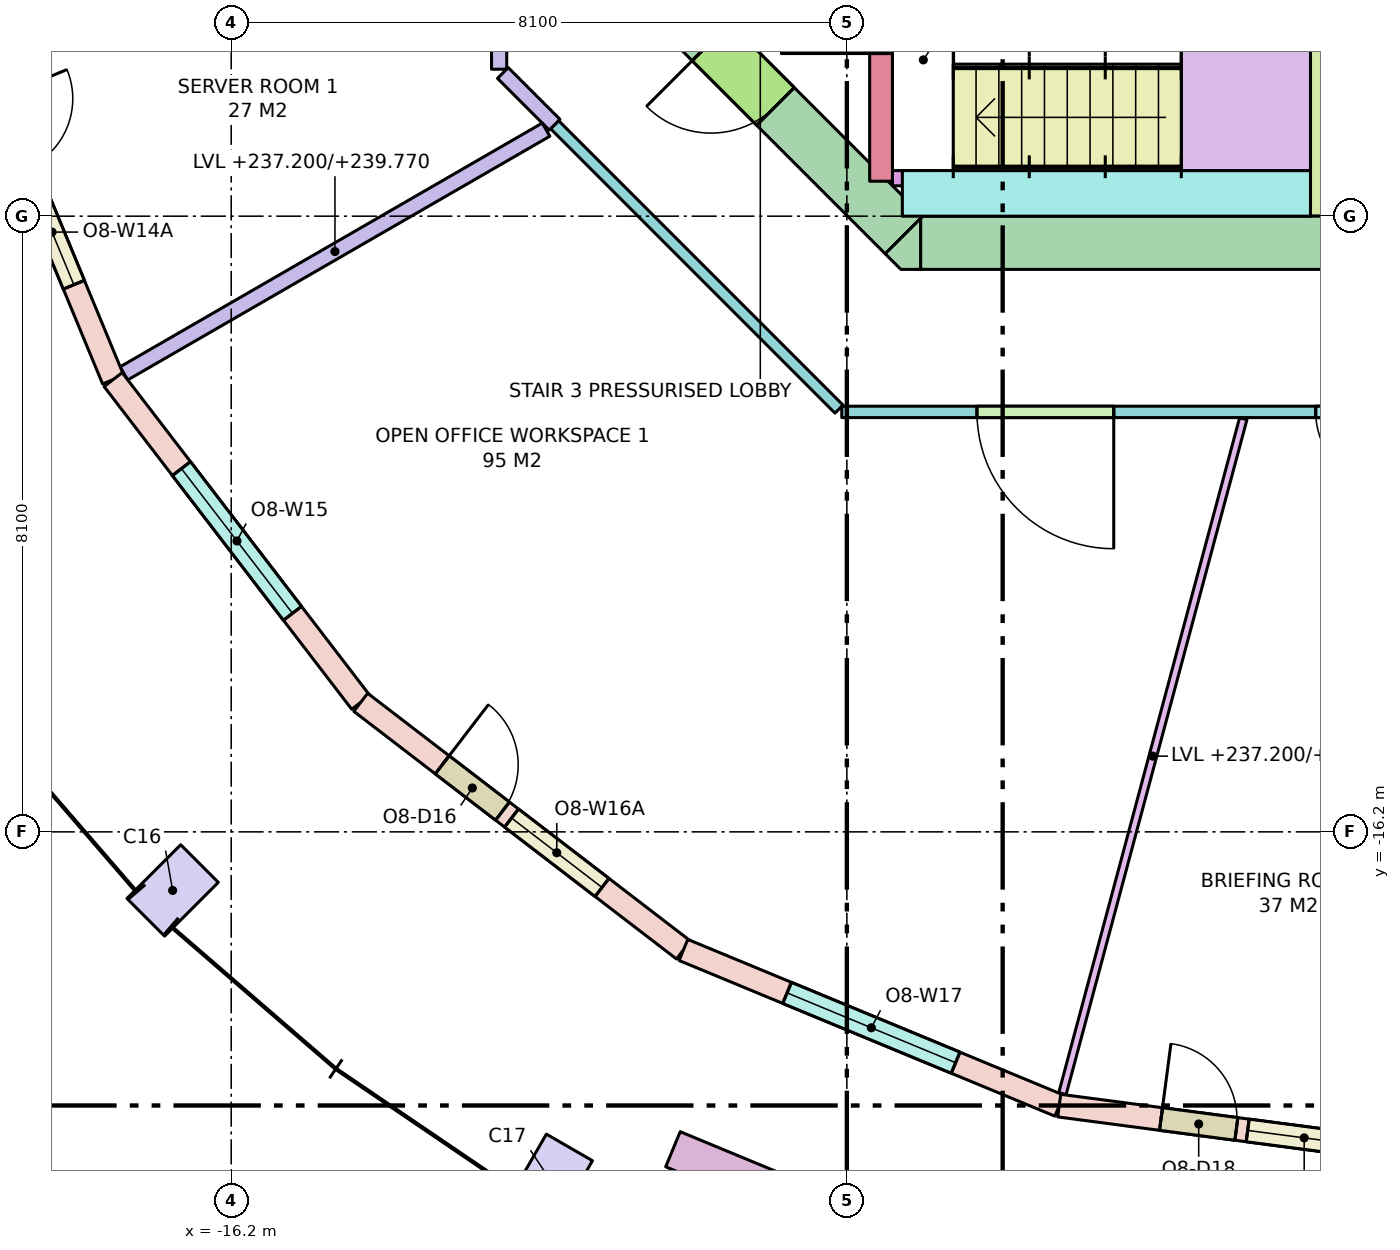
"""IFC4 building model, lengths in metres.
Left out: names, types, materials, properties, quantities, classifications, styles, units other than length and angle.
Written with IfcOpenShell. Run it as: python <this file> out.ifc"""

import sys

from ifc_helpers import new_model, si_unit, direction, frame, frame_2d, origin, origin_2d, place, context, subcontext, project, spatial, polyline, rectangle, outline, extrude, element, fill, save


model = new_model("IFC4")
c1 = context("Model", 3, precision=1e-05, world=origin(), true_north=direction((0.0, 1.0)))
c2 = subcontext(c1, "Body", "Model", "MODEL_VIEW")
j1 = project(units=[si_unit("LENGTHUNIT", "METRE"), si_unit("PLANEANGLEUNIT", "RADIAN")], contexts=[c1])
p1 = place(None, origin())
s1 = spatial("IfcSite", under=j1, at=p1, CompositionType="ELEMENT")
p2 = place(p1, origin())
s2 = spatial("IfcBuilding", under=s1, at=p2, CompositionType="ELEMENT")
p3 = place(p2, frame((0.0, 0.0, 237.2)))
s3 = spatial("IfcBuildingStorey", under=s2, at=p3, CompositionType="ELEMENT", Elevation=237.2)
for number, where, z_axis, x_axis in (
    (1, (-16.97, -16.97, 0.0), (0.0, 0.0, 1.0), (0.707, -0.707, 0.0)),
    (2, (-12.0, -20.785, 0.0), (0.0, 0.0, 1.0), (0.866, -0.5, 0.0)),
):
    element("IfcColumn", number, at=place(p3, frame(where, z_axis=z_axis, x_axis=x_axis)), inside=s3, PredefinedType="COLUMN", context=c2, shape_type="SweptSolid", body=[
        extrude(rectangle(XDim=0.7, YDim=1.0, at=origin_2d()), origin(), (0.0, 0.0, 1.0), 3.7),
    ])
p4 = place(p3, frame((-7.13, -8.45, -0.28), z_axis=(0.0, 0.0, 1.0), x_axis=(1.0, 0.0, 0.0)))
e3 = element("IfcWall", 3, at=p4, inside=s3, PredefinedType="SHEAR", context=c2, shape_type="SweptSolid", body=[
    extrude(rectangle(XDim=14.26, YDim=0.7, at=frame_2d((7.13, 0.0))), origin(), (0.0, 0.0, 1.0), 3.7),
])
p5 = place(p4, frame((8.08, 0.0, 0.28)))
e4 = element("IfcOpeningElement", 4, at=p5, cuts=e3, PredefinedType="OPENING", context=c2, shape_type="SweptSolid", body=[
    extrude(rectangle(XDim=0.7, YDim=2.1, at=frame_2d((0.35, 1.05))), frame((0.0, 0.36, 0.0), z_axis=(0.0, -1.0, 0.0), x_axis=(1.0, 0.0, 0.0)), (0.0, 0.0, 1.0), 0.72),
])
p6 = place(p4, frame((6.205, 0.0, 0.28)))
e5 = element("IfcOpeningElement", 5, at=p6, cuts=e3, PredefinedType="OPENING", context=c2, shape_type="SweptSolid", body=[
    extrude(rectangle(XDim=0.9, YDim=2.1, at=frame_2d((0.45, 1.05))), frame((0.0, 0.36, 0.0), z_axis=(0.0, -1.0, 0.0), x_axis=(1.0, 0.0, 0.0)), (0.0, 0.0, 1.0), 0.72),
])
p7 = place(p4, frame((9.521, 0.0, 0.28)))
e6 = element("IfcOpeningElement", 6, at=p7, cuts=e3, PredefinedType="OPENING", context=c2, shape_type="SweptSolid", body=[
    extrude(rectangle(XDim=0.9, YDim=2.1, at=frame_2d((0.45, 1.05))), frame((0.0, 0.36, 0.0), z_axis=(0.0, -1.0, 0.0), x_axis=(1.0, 0.0, 0.0)), (0.0, 0.0, 1.0), 0.72),
])
p8 = place(p4, frame((11.278, 0.0, 0.28)))
e7 = element("IfcOpeningElement", 7, at=p8, cuts=e3, PredefinedType="OPENING", context=c2, shape_type="SweptSolid", body=[
    extrude(rectangle(XDim=0.9, YDim=2.1, at=frame_2d((0.45, 1.05))), frame((0.0, 0.36, 0.0), z_axis=(0.0, -1.0, 0.0), x_axis=(1.0, 0.0, 0.0)), (0.0, 0.0, 1.0), 0.72),
])
p9 = place(p4, frame((12.84, 0.0, 0.28)))
e8 = element("IfcOpeningElement", 8, at=p9, cuts=e3, PredefinedType="OPENING", context=c2, shape_type="SweptSolid", body=[
    extrude(rectangle(XDim=0.9, YDim=2.1, at=frame_2d((0.45, 1.05))), frame((0.0, 0.36, 0.0), z_axis=(0.0, -1.0, 0.0), x_axis=(1.0, 0.0, 0.0)), (0.0, 0.0, 1.0), 0.72),
])
p10 = place(p3, frame((-7.347, -8.347, -0.28), z_axis=(0.0, 0.0, 1.0), x_axis=(-0.707106781187, 0.707106781187, 0.0)))
e9 = element("IfcWall", 9, at=p10, inside=s3, PredefinedType="SHEAR", context=c2, shape_type="SweptSolid", body=[
    extrude(rectangle(XDim=4.243, YDim=0.7, at=frame_2d((2.121, 0.0))), origin(), (0.0, 0.0, 1.0), 3.7),
])
p11 = place(p10, frame((2.393, 0.0, 0.28)))
e10 = element("IfcOpeningElement", 10, at=p11, cuts=e9, PredefinedType="OPENING", context=c2, shape_type="SweptSolid", body=[
    extrude(rectangle(XDim=1.2, YDim=2.1, at=frame_2d((0.6, 1.05))), frame((0.0, 0.36, 0.0), z_axis=(0.0, -1.0, 0.0), x_axis=(1.0, 0.0, 0.0)), (0.0, 0.0, 1.0), 0.72),
])
p12 = place(p3, frame((0.0, 0.0, -0.28)))
e11 = element("IfcWall", 11, at=p12, inside=s3, PredefinedType="SHEAR", context=c2, shape_type="SweptSolid", body=[
    extrude(outline(polyline([(-7.39, -8.8), (-7.595, -8.595), (-7.595, -8.595), (-7.595, -8.595), (-7.13, -8.13), (-7.13, -8.8), (-7.13, -8.8), (-7.39, -8.8)])), origin(), (0.0, 0.0, 1.0), 3.7),
])
p13 = place(p3, frame((-1.85, -8.1, 0.0), z_axis=(0.0, 0.0, 1.0), x_axis=(0.0, 1.0, 0.0)))
e12 = element("IfcWall", 12, at=p13, inside=s3, PredefinedType="SHEAR", context=c2, shape_type="SweptSolid", body=[
    extrude(rectangle(XDim=6.6, YDim=0.3, at=frame_2d((3.3, 0.0))), origin(), (0.0, 0.0, 1.0), 3.42),
])
p14 = place(p3, frame((-7.65, -7.64, 0.0), z_axis=(0.0, 0.0, 1.0), x_axis=(0.0, 1.0, 0.0)))
e13 = element("IfcWall", 13, at=p14, inside=s3, PredefinedType="SHEAR", context=c2, shape_type="SweptSolid", body=[
    extrude(rectangle(XDim=3.14, YDim=0.3, at=frame_2d((1.57, 0.0))), origin(), (0.0, 0.0, 1.0), 3.42),
])
p15 = place(p14, frame((1.68, 0.0, 0.0)))
e14 = element("IfcOpeningElement", 14, at=p15, cuts=e13, PredefinedType="OPENING", context=c2, shape_type="SweptSolid", body=[
    extrude(rectangle(XDim=1.32, YDim=2.1, at=frame_2d((0.66, 1.05))), frame((0.0, 0.16, 0.0), z_axis=(0.0, -1.0, 0.0), x_axis=(1.0, 0.0, 0.0)), (0.0, 0.0, 1.0), 0.32),
])
p16 = place(p3, frame((-7.5, -7.6, 0.0), z_axis=(0.0, 0.0, 1.0), x_axis=(1.0, 0.0, 0.0)))
e15 = element("IfcWall", 15, at=p16, inside=s3, PredefinedType="SHEAR", context=c2, shape_type="SweptSolid", body=[
    extrude(rectangle(XDim=0.6, YDim=0.2, at=frame_2d((0.3, 0.0))), origin(), (0.0, 0.0, 1.0), 3.42),
])
p17 = place(p3, frame((-7.37, -7.8, 0.0), z_axis=(0.0, 0.0, 1.0), x_axis=(1.0, 0.0, 0.0)))
e16 = element("IfcWall", 16, at=p17, inside=s3, PredefinedType="SHEAR", context=c2, shape_type="SweptSolid", body=[
    extrude(rectangle(XDim=5.37, YDim=0.6, at=frame_2d((2.685, 0.0))), origin(), (0.0, 0.0, 1.0), 3.42),
])
p18 = place(p3, frame((-19.802, -5.306, 0.0), z_axis=(0.0, 0.0, 1.0), x_axis=(0.382713071139, -0.923867255172, 0.0)))
e17 = element("IfcWall", 17, at=p18, inside=s3, PredefinedType="STANDARD", context=c2, shape_type="SweptSolid", body=[
    extrude(rectangle(XDim=5.352, YDim=0.3, at=frame_2d((2.676, 0.0))), origin(), (0.0, 0.0, 1.0), 3.42),
])
p19 = place(p18, frame((1.351, 0.0, 0.0)))
e18 = element("IfcOpeningElement", 18, at=p19, cuts=e17, PredefinedType="OPENING", context=c2, shape_type="SweptSolid", body=[
    extrude(rectangle(XDim=1.0, YDim=2.4, at=frame_2d((0.5, 1.2))), frame((0.0, 0.16, 0.0), z_axis=(0.0, -1.0, 0.0), x_axis=(1.0, 0.0, 0.0)), (0.0, 0.0, 1.0), 0.32),
])
p20 = place(p18, frame((2.501, 0.0, 0.8)))
e19 = element("IfcOpeningElement", 19, at=p20, cuts=e17, PredefinedType="OPENING", context=c2, shape_type="SweptSolid", body=[
    extrude(rectangle(XDim=1.5, YDim=2.4, at=frame_2d((0.75, 1.2))), frame((0.0, 0.16, 0.0), z_axis=(0.0, -1.0, 0.0), x_axis=(1.0, 0.0, 0.0)), (0.0, 0.0, 1.0), 0.32),
])
p21 = place(p3, frame((-17.753, -10.25, 0.0), z_axis=(0.0, 0.0, 1.0), x_axis=(0.60876670321, -0.793349293227, 0.0)))
e20 = element("IfcWall", 20, at=p21, inside=s3, PredefinedType="STANDARD", context=c2, shape_type="SweptSolid", body=[
    extrude(rectangle(XDim=5.352, YDim=0.3, at=frame_2d((2.676, 0.0))), origin(), (0.0, 0.0, 1.0), 3.42),
])
p22 = place(p21, frame((1.476, 0.0, 0.8)))
e21 = element("IfcOpeningElement", 21, at=p22, cuts=e20, PredefinedType="OPENING", context=c2, shape_type="SweptSolid", body=[
    extrude(rectangle(XDim=2.4, YDim=2.4, at=frame_2d((1.2, 1.2))), frame((0.0, 0.16, 0.0), z_axis=(0.0, -1.0, 0.0), x_axis=(1.0, 0.0, 0.0)), (0.0, 0.0, 1.0), 0.32),
])
p23 = place(p3, frame((-14.496, -14.496, 0.0), z_axis=(0.0, 0.0, 1.0), x_axis=(0.793349293227, -0.60876670321, 0.0)))
e22 = element("IfcWall", 22, at=p23, inside=s3, PredefinedType="STANDARD", context=c2, shape_type="SweptSolid", body=[
    extrude(rectangle(XDim=5.352, YDim=0.3, at=frame_2d((2.676, 0.0))), origin(), (0.0, 0.0, 1.0), 3.42),
])
p24 = place(p23, frame((1.351, 0.0, 0.0)))
e23 = element("IfcOpeningElement", 23, at=p24, cuts=e22, PredefinedType="OPENING", context=c2, shape_type="SweptSolid", body=[
    extrude(rectangle(XDim=1.0, YDim=2.4, at=frame_2d((0.5, 1.2))), frame((0.0, 0.16, 0.0), z_axis=(0.0, -1.0, 0.0), x_axis=(1.0, 0.0, 0.0)), (0.0, 0.0, 1.0), 0.32),
])
p25 = place(p23, frame((2.501, 0.0, 0.8)))
e24 = element("IfcOpeningElement", 24, at=p25, cuts=e22, PredefinedType="OPENING", context=c2, shape_type="SweptSolid", body=[
    extrude(rectangle(XDim=1.5, YDim=2.4, at=frame_2d((0.75, 1.2))), frame((0.0, 0.16, 0.0), z_axis=(0.0, -1.0, 0.0), x_axis=(1.0, 0.0, 0.0)), (0.0, 0.0, 1.0), 0.32),
])
p26 = place(p3, frame((-10.25, -17.753, 0.0), z_axis=(0.0, 0.0, 1.0), x_axis=(0.923867255172, -0.382713071139, 0.0)))
e25 = element("IfcWall", 25, at=p26, inside=s3, PredefinedType="STANDARD", context=c2, shape_type="SweptSolid", body=[
    extrude(rectangle(XDim=5.352, YDim=0.3, at=frame_2d((2.676, 0.0))), origin(), (0.0, 0.0, 1.0), 3.42),
])
p27 = place(p26, frame((1.476, 0.0, 0.8)))
e26 = element("IfcOpeningElement", 26, at=p27, cuts=e25, PredefinedType="OPENING", context=c2, shape_type="SweptSolid", body=[
    extrude(rectangle(XDim=2.4, YDim=2.4, at=frame_2d((1.2, 1.2))), frame((0.0, 0.16, 0.0), z_axis=(0.0, -1.0, 0.0), x_axis=(1.0, 0.0, 0.0)), (0.0, 0.0, 1.0), 0.32),
])
p28 = place(p3, frame((-5.306, -19.802, 0.0), z_axis=(0.0, 0.0, 1.0), x_axis=(0.991446064069, -0.130517056518, 0.0)))
e27 = element("IfcWall", 27, at=p28, inside=s3, PredefinedType="STANDARD", context=c2, shape_type="SweptSolid", body=[
    extrude(rectangle(XDim=5.352, YDim=0.3, at=frame_2d((2.676, 0.0))), origin(), (0.0, 0.0, 1.0), 3.42),
])
p29 = place(p28, frame((1.351, 0.0, 0.0)))
e28 = element("IfcOpeningElement", 28, at=p29, cuts=e27, PredefinedType="OPENING", context=c2, shape_type="SweptSolid", body=[
    extrude(rectangle(XDim=1.0, YDim=2.4, at=frame_2d((0.5, 1.2))), frame((0.0, 0.16, 0.0), z_axis=(0.0, -1.0, 0.0), x_axis=(1.0, 0.0, 0.0)), (0.0, 0.0, 1.0), 0.32),
])
p30 = place(p28, frame((2.501, 0.0, 0.8)))
e29 = element("IfcOpeningElement", 29, at=p30, cuts=e27, PredefinedType="OPENING", context=c2, shape_type="SweptSolid", body=[
    extrude(rectangle(XDim=1.5, YDim=2.4, at=frame_2d((0.75, 1.2))), frame((0.0, 0.16, 0.0), z_axis=(0.0, -1.0, 0.0), x_axis=(1.0, 0.0, 0.0)), (0.0, 0.0, 1.0), 0.32),
])
p31 = place(p3, frame((-10.388, -20.375, 0.0), z_axis=(0.0, 0.0, 1.0), x_axis=(0.923851510231, -0.38275107713, 0.0)))
e30 = element("IfcWall", 30, at=p31, inside=s3, PredefinedType="PARAPET", context=c2, shape_type="SweptSolid", body=[
    extrude(rectangle(XDim=3.6, YDim=0.5, at=frame_2d((1.8, 0.0))), origin(), (0.0, 0.0, 1.0), 0.9),
])
p32 = place(p3, frame((8.167, -10.675, 0.0), z_axis=(0.0, 0.0, 1.0), x_axis=(-1.0, 0.0, 0.0)))
e31 = element("IfcWall", 31, at=p32, inside=s3, PredefinedType="PARTITIONING", context=c2, shape_type="SweptSolid", body=[
    extrude(rectangle(XDim=16.333, YDim=0.15, at=frame_2d((8.167, 0.0))), origin(), (0.0, 0.0, 1.0), 2.57),
])
p33 = place(p32, frame((12.755, 0.0, 0.0)))
e32 = element("IfcOpeningElement", 32, at=p33, cuts=e31, PredefinedType="OPENING", context=c2, shape_type="SweptSolid", body=[
    extrude(rectangle(XDim=1.8, YDim=2.1, at=frame_2d((0.9, 1.05))), frame((0.0, 0.085, 0.0), z_axis=(0.0, -1.0, 0.0), x_axis=(1.0, 0.0, 0.0)), (0.0, 0.0, 1.0), 0.17),
])
p34 = place(p32, frame((9.098, 0.0, 0.0)))
e33 = element("IfcOpeningElement", 33, at=p34, cuts=e31, PredefinedType="OPENING", context=c2, shape_type="SweptSolid", body=[
    extrude(rectangle(XDim=1.0, YDim=2.1, at=frame_2d((0.5, 1.05))), frame((0.0, 0.085, 0.0), z_axis=(0.0, -1.0, 0.0), x_axis=(1.0, 0.0, 0.0)), (0.0, 0.0, 1.0), 0.17),
])
p35 = place(p32, frame((6.285, 0.0, 0.0)))
e34 = element("IfcOpeningElement", 34, at=p35, cuts=e31, PredefinedType="OPENING", context=c2, shape_type="SweptSolid", body=[
    extrude(rectangle(XDim=0.9, YDim=2.1, at=frame_2d((0.45, 1.05))), frame((0.0, 0.085, 0.0), z_axis=(0.0, -1.0, 0.0), x_axis=(1.0, 0.0, 0.0)), (0.0, 0.0, 1.0), 0.17),
])
p36 = place(p32, frame((3.201, 0.0, 0.0)))
e35 = element("IfcOpeningElement", 35, at=p36, cuts=e31, PredefinedType="OPENING", context=c2, shape_type="SweptSolid", body=[
    extrude(rectangle(XDim=0.9, YDim=2.1, at=frame_2d((0.45, 1.05))), frame((0.0, 0.085, 0.0), z_axis=(0.0, -1.0, 0.0), x_axis=(1.0, 0.0, 0.0)), (0.0, 0.0, 1.0), 0.17),
])
p37 = place(p3, frame((-8.204, -10.638, 0.0), z_axis=(0.0, 0.0, 1.0), x_axis=(-0.707106781187, 0.707106781187, 0.0)))
e36 = element("IfcWall", 36, at=p37, inside=s3, PredefinedType="PARTITIONING", context=c2, shape_type="SweptSolid", body=[
    extrude(rectangle(XDim=5.291, YDim=0.15, at=frame_2d((2.646, 0.0))), origin(), (0.0, 0.0, 1.0), 2.57),
])
p38 = place(p3, frame((-11.945, -6.896, 0.0), z_axis=(0.0, 0.0, 1.0), x_axis=(-0.707106781187, 0.707106781187, 0.0)))
e37 = element("IfcWall", 37, at=p38, inside=s3, PredefinedType="PARTITIONING", context=c2, shape_type="SweptSolid", body=[
    extrude(rectangle(XDim=0.962, YDim=0.2, at=frame_2d((0.481, 0.0))), origin(), (0.0, 0.0, 1.0), 2.57),
])
p39 = place(p3, frame((-12.675, -6.167, 0.0), z_axis=(0.0, 0.0, 1.0), x_axis=(0.0, 1.0, 0.0)))
e38 = element("IfcWall", 38, at=p39, inside=s3, PredefinedType="PARTITIONING", context=c2, shape_type="SweptSolid", body=[
    extrude(rectangle(XDim=2.77, YDim=0.2, at=frame_2d((1.385, 0.0))), origin(), (0.0, 0.0, 1.0), 2.57),
])
p40 = place(p39, frame((0.935, 0.0, 0.0)))
e39 = element("IfcOpeningElement", 39, at=p40, cuts=e38, PredefinedType="OPENING", context=c2, shape_type="SweptSolid", body=[
    extrude(rectangle(XDim=0.9, YDim=2.1, at=frame_2d((0.45, 1.05))), frame((0.0, 0.11, 0.0), z_axis=(0.0, -1.0, 0.0), x_axis=(1.0, 0.0, 0.0)), (0.0, 0.0, 1.0), 0.22),
])
p41 = place(p3, frame((-12.058, -6.961, 0.0), z_axis=(0.0, 0.0, 1.0), x_axis=(-0.866013799398, -0.500020098848, 0.0)))
e40 = element("IfcWall", 40, at=p41, inside=s3, PredefinedType="PARTITIONING", context=c2, shape_type="SweptSolid", body=[
    extrude(rectangle(XDim=6.414, YDim=0.2, at=frame_2d((3.207, 0.0))), origin(), (0.0, 0.0, 1.0), 2.57),
])
p42 = place(p3, frame((-2.884, -10.764, 0.0), z_axis=(0.0, 0.0, 1.0), x_axis=(-0.258811310764, -0.965927898666, 0.0)))
e41 = element("IfcWall", 41, at=p42, inside=s3, PredefinedType="PARTITIONING", context=c2, shape_type="SweptSolid", body=[
    extrude(rectangle(XDim=9.193, YDim=0.1, at=frame_2d((4.596, 0.0))), origin(), (0.0, 0.0, 1.0), 2.57),
])
p43 = place(p20, origin())
e42 = element("IfcWindow", 42, at=p43, inside=s3, PartitioningType="SINGLE_PANEL", PredefinedType="WINDOW", context=c2, shape_type="SweptSolid", body=[
    extrude(rectangle(XDim=1.5, YDim=2.4, at=frame_2d((0.75, 1.2))), frame((0.0, 0.03, 0.0), z_axis=(0.0, -1.0, 0.0), x_axis=(1.0, 0.0, 0.0)), (0.0, 0.0, 1.0), 0.06),
])
fill(e19, e42)
p44 = place(p22, origin())
e43 = element("IfcWindow", 43, at=p44, inside=s3, PartitioningType="SINGLE_PANEL", PredefinedType="WINDOW", context=c2, shape_type="SweptSolid", body=[
    extrude(rectangle(XDim=2.4, YDim=2.4, at=frame_2d((1.2, 1.2))), frame((0.0, 0.03, 0.0), z_axis=(0.0, -1.0, 0.0), x_axis=(1.0, 0.0, 0.0)), (0.0, 0.0, 1.0), 0.06),
])
fill(e21, e43)
p45 = place(p24, origin())
e44 = element("IfcDoor", 44, at=p45, inside=s3, OperationType="SINGLE_SWING_LEFT", PredefinedType="DOOR", context=c2, shape_type="SweptSolid", body=[
    extrude(rectangle(XDim=1.0, YDim=2.4, at=frame_2d((0.5, 1.2))), frame((0.0, 0.025, 0.0), z_axis=(0.0, -1.0, 0.0), x_axis=(1.0, 0.0, 0.0)), (0.0, 0.0, 1.0), 0.05),
])
fill(e23, e44)
p46 = place(p25, origin())
e45 = element("IfcWindow", 45, at=p46, inside=s3, PartitioningType="SINGLE_PANEL", PredefinedType="WINDOW", context=c2, shape_type="SweptSolid", body=[
    extrude(rectangle(XDim=1.5, YDim=2.4, at=frame_2d((0.75, 1.2))), frame((0.0, 0.03, 0.0), z_axis=(0.0, -1.0, 0.0), x_axis=(1.0, 0.0, 0.0)), (0.0, 0.0, 1.0), 0.06),
])
fill(e24, e45)
p47 = place(p27, origin())
e46 = element("IfcWindow", 46, at=p47, inside=s3, PartitioningType="SINGLE_PANEL", PredefinedType="WINDOW", context=c2, shape_type="SweptSolid", body=[
    extrude(rectangle(XDim=2.4, YDim=2.4, at=frame_2d((1.2, 1.2))), frame((0.0, 0.03, 0.0), z_axis=(0.0, -1.0, 0.0), x_axis=(1.0, 0.0, 0.0)), (0.0, 0.0, 1.0), 0.06),
])
fill(e26, e46)
p48 = place(p29, origin())
e47 = element("IfcDoor", 47, at=p48, inside=s3, OperationType="SINGLE_SWING_LEFT", PredefinedType="DOOR", context=c2, shape_type="SweptSolid", body=[
    extrude(rectangle(XDim=1.0, YDim=2.4, at=frame_2d((0.5, 1.2))), frame((0.0, 0.025, 0.0), z_axis=(0.0, -1.0, 0.0), x_axis=(1.0, 0.0, 0.0)), (0.0, 0.0, 1.0), 0.05),
])
fill(e28, e47)
p49 = place(p30, origin())
e48 = element("IfcWindow", 48, at=p49, inside=s3, PartitioningType="SINGLE_PANEL", PredefinedType="WINDOW", context=c2, shape_type="SweptSolid", body=[
    extrude(rectangle(XDim=1.5, YDim=2.4, at=frame_2d((0.75, 1.2))), frame((0.0, 0.03, 0.0), z_axis=(0.0, -1.0, 0.0), x_axis=(1.0, 0.0, 0.0)), (0.0, 0.0, 1.0), 0.06),
])
fill(e29, e48)
p50 = place(p15, origin())
e49 = element("IfcDoor", 49, at=p50, inside=s3, OperationType="DOUBLE_DOOR_SINGLE_SWING", PredefinedType="DOOR", context=c2, shape_type="SweptSolid", body=[
    extrude(rectangle(XDim=1.32, YDim=2.1, at=frame_2d((0.66, 1.05))), frame((0.0, 0.025, 0.0), z_axis=(0.0, -1.0, 0.0), x_axis=(1.0, 0.0, 0.0)), (0.0, 0.0, 1.0), 0.05),
])
fill(e14, e49)
p51 = place(p11, origin())
e50 = element("IfcDoor", 50, at=p51, inside=s3, OperationType="SINGLE_SWING_RIGHT", PredefinedType="DOOR", context=c2, shape_type="SweptSolid", body=[
    extrude(rectangle(XDim=1.2, YDim=2.1, at=frame_2d((0.6, 1.05))), frame((0.0, 0.025, 0.0), z_axis=(0.0, -1.0, 0.0), x_axis=(1.0, 0.0, 0.0)), (0.0, 0.0, 1.0), 0.05),
])
fill(e10, e50)
p52 = place(p33, origin())
e51 = element("IfcDoor", 51, at=p52, inside=s3, OperationType="DOUBLE_DOOR_SINGLE_SWING", PredefinedType="DOOR", context=c2, shape_type="SweptSolid", body=[
    extrude(rectangle(XDim=1.8, YDim=2.1, at=frame_2d((0.9, 1.05))), frame((0.0, 0.025, 0.0), z_axis=(0.0, -1.0, 0.0), x_axis=(1.0, 0.0, 0.0)), (0.0, 0.0, 1.0), 0.05),
])
fill(e32, e51)
p53 = place(p34, origin())
e52 = element("IfcDoor", 52, at=p53, inside=s3, OperationType="SINGLE_SWING_LEFT", PredefinedType="DOOR", context=c2, shape_type="SweptSolid", body=[
    extrude(rectangle(XDim=1.0, YDim=2.1, at=frame_2d((0.5, 1.05))), frame((0.0, 0.025, 0.0), z_axis=(0.0, -1.0, 0.0), x_axis=(1.0, 0.0, 0.0)), (0.0, 0.0, 1.0), 0.05),
])
fill(e33, e52)
save(model, sys.argv[1])
